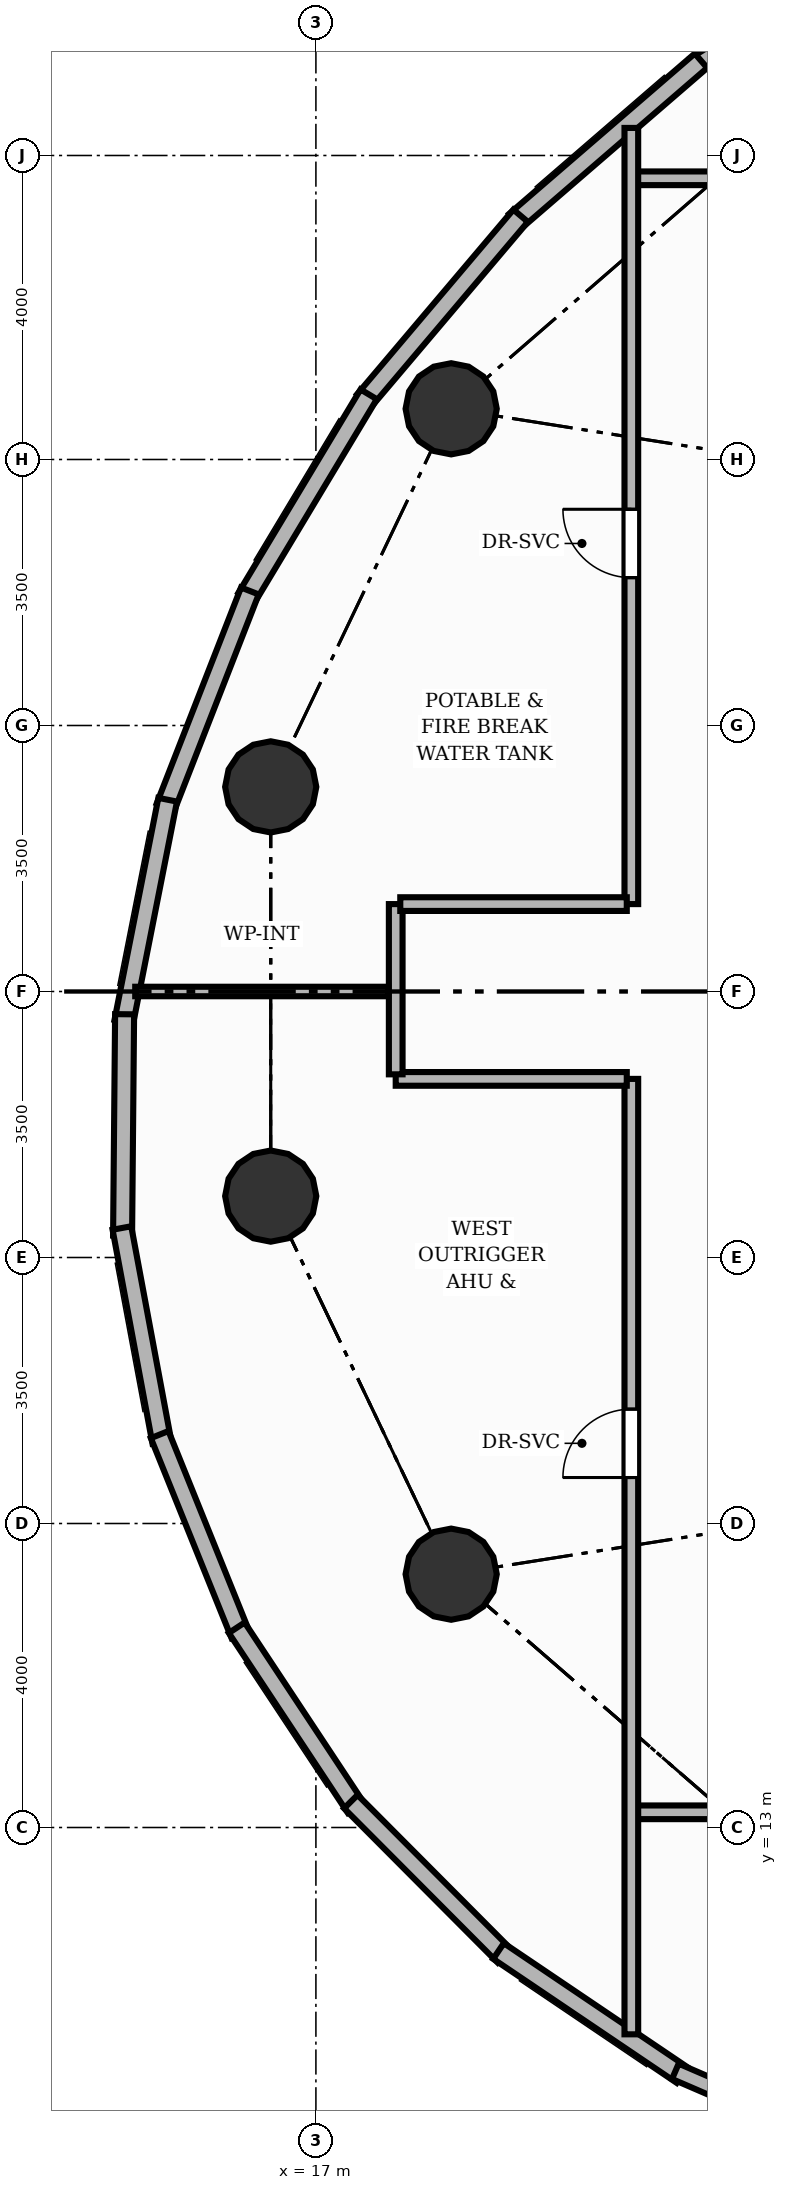
"""IFC4 building model, lengths in metres.
Left out: names, types, materials, properties, quantities, classifications, styles, units other than length and angle.
Written with IfcOpenShell. Run it as: python <this file> out.ifc"""

import sys

from ifc_helpers import new_model, si_unit, direction, frame, frame_2d, origin, origin_2d, place, context, subcontext, project, spatial, rectangle, circle, extrude, element, fill, save


model = new_model("IFC4")
c1 = context("Model", 3, precision=1e-05, world=origin(), true_north=direction((0.0, 1.0)))
c2 = subcontext(c1, "Body", "Model", "MODEL_VIEW")
j1 = project(units=[si_unit("LENGTHUNIT", "METRE"), si_unit("PLANEANGLEUNIT", "RADIAN")], contexts=[c1])
p1 = place(None, origin())
s1 = spatial("IfcSite", under=j1, at=p1, CompositionType="ELEMENT")
p2 = place(p1, origin())
s2 = spatial("IfcBuilding", under=s1, at=p2, CompositionType="ELEMENT")
p3 = place(p2, frame((0.0, 0.0, 112.48)))
s3 = spatial("IfcBuildingStorey", under=s2, at=p3, CompositionType="ELEMENT", Elevation=112.48)
for number, where, z_axis, x_axis in (
    (1, (18.78, 31.667, 0.0), (0.0, 0.0, 1.0), (1.0, 0.0, 0.0)),
    (2, (16.406, 26.692, 0.0), (0.0, 0.0, 1.0), (1.0, 0.0, 0.0)),
    (3, (16.406, 21.308, 0.0), (0.0, 0.0, 1.0), (1.0, 0.0, 0.0)),
    (4, (18.78, 16.333, 0.0), (0.0, 0.0, 1.0), (1.0, 0.0, 0.0)),
):
    element("IfcColumn", number, at=place(p3, frame(where, z_axis=z_axis, x_axis=x_axis)), inside=s3, PredefinedType="COLUMN", context=c2, shape_type="SweptSolid", body=[
        extrude(circle(Radius=0.6, at=origin_2d()), origin(), (0.0, 0.0, 1.0), 4.48),
    ])
p4 = place(p3, frame((21.989, 36.19, 0.0), z_axis=(0.0, 0.0, 1.0), x_axis=(0.847457608368, 0.530863072759, 0.0)))
e5 = element("IfcWall", 5, at=p4, inside=s3, PredefinedType="PARAPET", context=c2, shape_type="SweptSolid", body=[
    extrude(rectangle(XDim=3.25, YDim=0.22, at=frame_2d((1.625, 0.0))), origin(), (0.0, 0.0, 1.0), 1.15),
])
p5 = place(p3, frame((19.625, 34.138, 0.0), z_axis=(0.0, 0.0, 1.0), x_axis=(0.756826410558, 0.653615930254, 0.0)))
e6 = element("IfcWall", 6, at=p5, inside=s3, PredefinedType="SOLIDWALL", context=c2, shape_type="SweptSolid", body=[
    extrude(rectangle(XDim=3.227, YDim=0.25, at=frame_2d((1.613, 0.0))), origin(), (0.0, 0.0, 1.0), 4.24),
])
p6 = place(p3, frame((17.638, 31.778, 0.0), z_axis=(0.0, 0.0, 1.0), x_axis=(0.646014464781, 0.763325167471, 0.0)))
e7 = element("IfcWall", 7, at=p6, inside=s3, PredefinedType="SOLIDWALL", context=c2, shape_type="SweptSolid", body=[
    extrude(rectangle(XDim=3.182, YDim=0.25, at=frame_2d((1.591, 0.0))), origin(), (0.0, 0.0, 1.0), 4.24),
])
p7 = place(p3, frame((16.088, 29.182, 0.0), z_axis=(0.0, 0.0, 1.0), x_axis=(0.514840799828, 0.857285804637, 0.0)))
e8 = element("IfcWall", 8, at=p7, inside=s3, PredefinedType="SOLIDWALL", context=c2, shape_type="SweptSolid", body=[
    extrude(rectangle(XDim=3.121, YDim=0.25, at=frame_2d((1.561, 0.0))), origin(), (0.0, 0.0, 1.0), 4.24),
])
p8 = place(p3, frame((15.022, 26.428, 0.0), z_axis=(0.0, 0.0, 1.0), x_axis=(0.363554342734, 0.931572992244, 0.0)))
e9 = element("IfcWall", 9, at=p8, inside=s3, PredefinedType="SOLIDWALL", context=c2, shape_type="SweptSolid", body=[
    extrude(rectangle(XDim=3.051, YDim=0.25, at=frame_2d((1.525, 0.0))), origin(), (0.0, 0.0, 1.0), 4.24),
])
p9 = place(p3, frame((14.473, 23.601, 0.0), z_axis=(0.0, 0.0, 1.0), x_axis=(0.193703626227, 0.981060092546, 0.0)))
e10 = element("IfcWall", 10, at=p9, inside=s3, PredefinedType="SOLIDWALL", context=c2, shape_type="SweptSolid", body=[
    extrude(rectangle(XDim=2.978, YDim=0.25, at=frame_2d((1.489, 0.0))), origin(), (0.0, 0.0, 1.0), 4.24),
])
p10 = place(p3, frame((14.456, 20.788, 0.0), z_axis=(0.0, 0.0, 1.0), x_axis=(0.009134717755, 0.999958277595, 0.0)))
e11 = element("IfcWall", 11, at=p10, inside=s3, PredefinedType="SOLIDWALL", context=c2, shape_type="SweptSolid", body=[
    extrude(rectangle(XDim=2.913, YDim=0.25, at=frame_2d((1.457, 0.0))), origin(), (0.0, 0.0, 1.0), 4.24),
])
p11 = place(p3, frame((14.973, 18.073, 0.0), z_axis=(0.0, 0.0, 1.0), x_axis=(-0.183444393849, 0.98303008823, 0.0)))
e12 = element("IfcWall", 12, at=p11, inside=s3, PredefinedType="SOLIDWALL", context=c2, shape_type="SweptSolid", body=[
    extrude(rectangle(XDim=2.864, YDim=0.25, at=frame_2d((1.432, 0.0))), origin(), (0.0, 0.0, 1.0), 4.24),
])
for number, where, z_axis, x_axis in (
    (13, (16.006, 15.538, 0.0), (0.0, 0.0, 1.0), (-0.374, 0.927, 0.0)),
    (14, (17.524, 13.261, 0.0), (0.0, 0.0, 1.0), (-0.552, 0.834, 0.0)),
):
    element("IfcWall", number, at=place(p3, frame(where, z_axis=z_axis, x_axis=x_axis)), inside=s3, PredefinedType="SOLIDWALL", context=c2, shape_type="SweptSolid", body=[
        extrude(rectangle(XDim=2.838, YDim=0.25, at=frame_2d((1.419, 0.0))), origin(), (0.0, 0.0, 1.0), 4.24),
    ])
p12 = place(p3, frame((19.48, 11.31, 0.0), z_axis=(0.0, 0.0, 1.0), x_axis=(-0.705528090387, 0.708681955235, 0.0)))
e15 = element("IfcWall", 15, at=p12, inside=s3, PredefinedType="SOLIDWALL", context=c2, shape_type="SweptSolid", body=[
    extrude(rectangle(XDim=2.864, YDim=0.25, at=frame_2d((1.432, 0.0))), origin(), (0.0, 0.0, 1.0), 4.24),
])
p13 = place(p3, frame((21.817, 9.744, 0.0), z_axis=(0.0, 0.0, 1.0), x_axis=(-0.828669865655, 0.559737665121, 0.0)))
e16 = element("IfcWall", 16, at=p13, inside=s3, PredefinedType="SOLIDWALL", context=c2, shape_type="SweptSolid", body=[
    extrude(rectangle(XDim=2.913, YDim=0.25, at=frame_2d((1.457, 0.0))), origin(), (0.0, 0.0, 1.0), 4.24),
])
p14 = place(p3, frame((24.463, 8.61, 0.0), z_axis=(0.0, 0.0, 1.0), x_axis=(-0.917825556338, 0.396983939389, 0.0)))
e17 = element("IfcWall", 17, at=p14, inside=s3, PredefinedType="PARAPET", context=c2, shape_type="SweptSolid", body=[
    extrude(rectangle(XDim=2.978, YDim=0.22, at=frame_2d((1.489, 0.0))), origin(), (0.0, 0.0, 1.0), 1.15),
])
p15 = place(p3, frame((42.85, 13.2, 0.0), z_axis=(0.0, 0.0, 1.0), x_axis=(-1.0, 0.0, 0.0)))
e18 = element("IfcWall", 18, at=p15, inside=s3, PredefinedType="PARTITIONING", context=c2, shape_type="SweptSolid", body=[
    extrude(rectangle(XDim=21.7, YDim=0.18, at=frame_2d((10.85, 0.0))), origin(), (0.0, 0.0, 1.0), 3.691),
])
p16 = place(p15, frame((10.4, 0.0, 0.0)))
e19 = element("IfcOpeningElement", 19, at=p16, cuts=e18, PredefinedType="OPENING", context=c2, shape_type="SweptSolid", body=[
    extrude(rectangle(XDim=0.9, YDim=2.1, at=frame_2d((0.45, 1.05))), frame((0.0, 0.1, 0.0), z_axis=(0.0, -1.0, 0.0), x_axis=(1.0, 0.0, 0.0)), (0.0, 0.0, 1.0), 0.2),
])
p17 = place(p3, frame((21.15, 34.7, 0.0), z_axis=(0.0, 0.0, 1.0), x_axis=(1.0, 0.0, 0.0)))
e20 = element("IfcWall", 20, at=p17, inside=s3, PredefinedType="PARTITIONING", context=c2, shape_type="SweptSolid", body=[
    extrude(rectangle(XDim=21.7, YDim=0.18, at=frame_2d((10.85, 0.0))), origin(), (0.0, 0.0, 1.0), 3.691),
])
p18 = place(p17, frame((15.715, 0.0, 0.0)))
e21 = element("IfcOpeningElement", 21, at=p18, cuts=e20, PredefinedType="OPENING", context=c2, shape_type="SweptSolid", body=[
    extrude(rectangle(XDim=0.9, YDim=2.1, at=frame_2d((0.45, 1.05))), frame((0.0, 0.1, 0.0), z_axis=(0.0, -1.0, 0.0), x_axis=(1.0, 0.0, 0.0)), (0.0, 0.0, 1.0), 0.2),
])
p19 = place(p17, frame((8.4, 0.0, 0.0)))
e22 = element("IfcOpeningElement", 22, at=p19, cuts=e20, PredefinedType="OPENING", context=c2, shape_type="SweptSolid", body=[
    extrude(rectangle(XDim=0.9, YDim=2.1, at=frame_2d((0.45, 1.05))), frame((0.0, 0.1, 0.0), z_axis=(0.0, -1.0, 0.0), x_axis=(1.0, 0.0, 0.0)), (0.0, 0.0, 1.0), 0.2),
])
p20 = place(p17, frame((3.365, 0.0, 0.0)))
e23 = element("IfcOpeningElement", 23, at=p20, cuts=e20, PredefinedType="OPENING", context=c2, shape_type="SweptSolid", body=[
    extrude(rectangle(XDim=0.9, YDim=2.1, at=frame_2d((0.45, 1.05))), frame((0.0, 0.1, 0.0), z_axis=(0.0, -1.0, 0.0), x_axis=(1.0, 0.0, 0.0)), (0.0, 0.0, 1.0), 0.2),
])
p21 = place(p3, frame((21.15, 10.279, 0.0), z_axis=(0.0, 0.0, 1.0), x_axis=(0.0, 1.0, 0.0)))
e24 = element("IfcWall", 24, at=p21, inside=s3, PredefinedType="PARTITIONING", context=c2, shape_type="SweptSolid", body=[
    extrude(rectangle(XDim=12.571, YDim=0.18, at=frame_2d((6.286, 0.0))), origin(), (0.0, 0.0, 1.0), 4.235),
])
p22 = place(p21, frame((7.326, 0.0, 0.0)))
e25 = element("IfcOpeningElement", 25, at=p22, cuts=e24, PredefinedType="OPENING", context=c2, shape_type="SweptSolid", body=[
    extrude(rectangle(XDim=0.9, YDim=2.1, at=frame_2d((0.45, 1.05))), frame((0.0, 0.1, 0.0), z_axis=(0.0, -1.0, 0.0), x_axis=(1.0, 0.0, 0.0)), (0.0, 0.0, 1.0), 0.2),
])
p23 = place(p3, frame((21.09, 22.85, 0.0), z_axis=(0.0, 0.0, 1.0), x_axis=(-1.0, 0.0, 0.0)))
e26 = element("IfcWall", 26, at=p23, inside=s3, PredefinedType="PARTITIONING", context=c2, shape_type="SweptSolid", body=[
    extrude(rectangle(XDim=3.04, YDim=0.18, at=frame_2d((1.52, 0.0))), origin(), (0.0, 0.0, 1.0), 4.235),
])
p24 = place(p3, frame((18.05, 22.91, 0.0), z_axis=(0.0, 0.0, 1.0), x_axis=(0.0, 1.0, 0.0)))
e27 = element("IfcWall", 27, at=p24, inside=s3, PredefinedType="PARTITIONING", context=c2, shape_type="SweptSolid", body=[
    extrude(rectangle(XDim=2.24, YDim=0.18, at=frame_2d((1.12, 0.0))), origin(), (0.0, 0.0, 1.0), 3.691),
])
p25 = place(p3, frame((21.15, 25.15, 0.0), z_axis=(0.0, 0.0, 1.0), x_axis=(0.0, 1.0, 0.0)))
e28 = element("IfcWall", 28, at=p25, inside=s3, PredefinedType="PARTITIONING", context=c2, shape_type="SweptSolid", body=[
    extrude(rectangle(XDim=10.213, YDim=0.18, at=frame_2d((5.106, 0.0))), origin(), (0.0, 0.0, 1.0), 4.235),
])
p26 = place(p25, frame((4.295, 0.0, 0.0)))
e29 = element("IfcOpeningElement", 29, at=p26, cuts=e28, PredefinedType="OPENING", context=c2, shape_type="SweptSolid", body=[
    extrude(rectangle(XDim=0.9, YDim=2.1, at=frame_2d((0.45, 1.05))), frame((0.0, 0.1, 0.0), z_axis=(0.0, -1.0, 0.0), x_axis=(1.0, 0.0, 0.0)), (0.0, 0.0, 1.0), 0.2),
])
p27 = place(p3, frame((18.11, 25.15, 0.0), z_axis=(0.0, 0.0, 1.0), x_axis=(1.0, 0.0, 0.0)))
e30 = element("IfcWall", 30, at=p27, inside=s3, PredefinedType="PARTITIONING", context=c2, shape_type="SweptSolid", body=[
    extrude(rectangle(XDim=2.98, YDim=0.18, at=frame_2d((1.49, 0.0))), origin(), (0.0, 0.0, 1.0), 4.235),
])
p28 = place(p3, frame((14.623, 24.0, 0.0), z_axis=(0.0, 0.0, 1.0), x_axis=(1.0, 0.0, 0.0)))
e31 = element("IfcWall", 31, at=p28, inside=s3, PredefinedType="PARTITIONING", context=c2, shape_type="SweptSolid", body=[
    extrude(rectangle(XDim=3.327, YDim=0.125, at=frame_2d((1.664, 0.0))), origin(), (0.0, 0.0, 1.0), 4.235),
])
p29 = place(p22, origin())
e32 = element("IfcDoor", 32, at=p29, inside=s3, OperationType="SINGLE_SWING_LEFT", PredefinedType="DOOR", context=c2, shape_type="SweptSolid", body=[
    extrude(rectangle(XDim=0.9, YDim=2.1, at=frame_2d((0.45, 1.05))), frame((0.0, 0.025, 0.0), z_axis=(0.0, -1.0, 0.0), x_axis=(1.0, 0.0, 0.0)), (0.0, 0.0, 1.0), 0.05),
])
fill(e25, e32)
p30 = place(p26, origin())
e33 = element("IfcDoor", 33, at=p30, inside=s3, OperationType="SINGLE_SWING_RIGHT", PredefinedType="DOOR", context=c2, shape_type="SweptSolid", body=[
    extrude(rectangle(XDim=0.9, YDim=2.1, at=frame_2d((0.45, 1.05))), frame((0.0, 0.025, 0.0), z_axis=(0.0, -1.0, 0.0), x_axis=(1.0, 0.0, 0.0)), (0.0, 0.0, 1.0), 0.05),
])
fill(e29, e33)
save(model, sys.argv[1])
